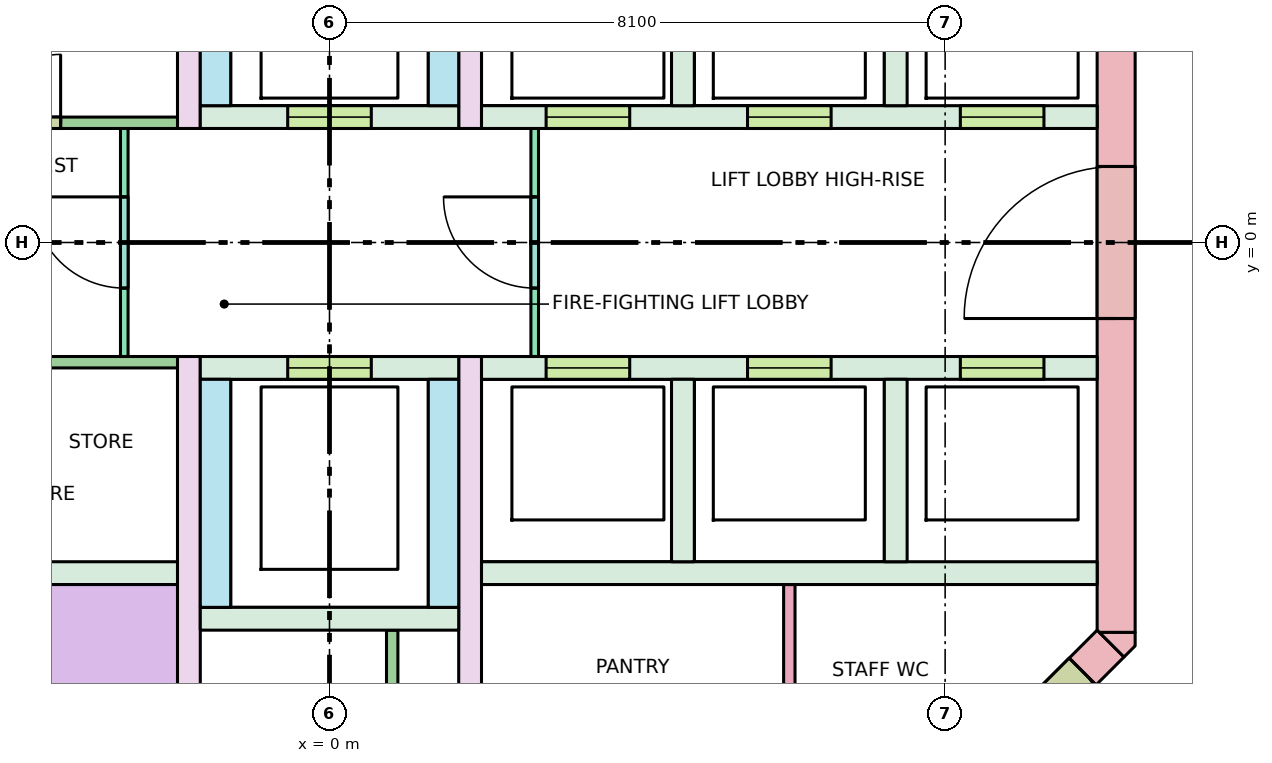
"""IFC4 building model, lengths in metres.
Left out: names, types, materials, properties, quantities, classifications, styles, units other than length and angle.
Written with IfcOpenShell. Run it as: python <this file> out.ifc"""

import sys

from ifc_helpers import new_model, si_unit, direction, frame, frame_2d, origin, place, context, subcontext, project, spatial, polyline, rectangle, outline, extrude, element, fill, save


model = new_model("IFC4")
c1 = context("Model", 3, precision=1e-05, world=origin(), true_north=direction((0.0, 1.0)))
c2 = subcontext(c1, "Body", "Model", "MODEL_VIEW")
j1 = project(units=[si_unit("LENGTHUNIT", "METRE"), si_unit("PLANEANGLEUNIT", "RADIAN")], contexts=[c1])
p1 = place(None, origin())
s1 = spatial("IfcSite", under=j1, at=p1, CompositionType="ELEMENT")
p2 = place(p1, origin())
s2 = spatial("IfcBuilding", under=s1, at=p2, CompositionType="ELEMENT")
p3 = place(p2, frame((0.0, 0.0, 287.1)))
s3 = spatial("IfcBuildingStorey", under=s2, at=p3, CompositionType="ELEMENT", Elevation=287.1)
p4 = place(p3, frame((10.35, -5.13, -0.28), z_axis=(0.0, 0.0, 1.0), x_axis=(0.0, 1.0, 0.0)))
e1 = element("IfcWall", 1, at=p4, inside=s3, PredefinedType="SHEAR", context=c2, shape_type="SweptSolid", body=[
    extrude(rectangle(XDim=10.26, YDim=0.5, at=frame_2d((5.13, 0.0))), origin(), (0.0, 0.0, 1.0), 3.7),
])
p5 = place(p4, frame((4.13, 0.0, 0.28)))
e2 = element("IfcOpeningElement", 2, at=p5, cuts=e1, PredefinedType="OPENING", context=c2, shape_type="SweptSolid", body=[
    extrude(rectangle(XDim=2.0, YDim=2.1, at=frame_2d((1.0, 1.05))), frame((0.0, 0.26, 0.0), z_axis=(0.0, -1.0, 0.0), x_axis=(1.0, 0.0, 0.0)), (0.0, 0.0, 1.0), 0.52),
])
p6 = place(p3, frame((10.277, -5.277, -0.28), z_axis=(0.0, 0.0, 1.0), x_axis=(-0.707106781187, -0.707106781187, 0.0)))
e3 = element("IfcWall", 3, at=p6, inside=s3, PredefinedType="SHEAR", context=c2, shape_type="SweptSolid", body=[
    extrude(rectangle(XDim=4.243, YDim=0.5, at=frame_2d((2.121, 0.0))), origin(), (0.0, 0.0, 1.0), 3.7),
])
p7 = place(p6, frame((0.52, 0.0, 0.28)))
e4 = element("IfcOpeningElement", 4, at=p7, cuts=e3, PredefinedType="OPENING", context=c2, shape_type="SweptSolid", body=[
    extrude(rectangle(XDim=0.9, YDim=2.1, at=frame_2d((0.45, 1.05))), frame((0.0, 0.26, 0.0), z_axis=(0.0, -1.0, 0.0), x_axis=(1.0, 0.0, 0.0)), (0.0, 0.0, 1.0), 0.52),
])
p8 = place(p3, frame((0.0, 0.0, -0.28)))
e5 = element("IfcWall", 5, at=p8, inside=s3, PredefinedType="SHEAR", context=c2, shape_type="SweptSolid", body=[
    extrude(outline(polyline([(10.6, -5.307), (10.454, -5.454), (10.13, -5.13), (10.6, -5.13), (10.6, -5.307)])), origin(), (0.0, 0.0, 1.0), 3.7),
])
for number, where, z_axis, x_axis in (
    (6, (-10.1, -4.35, 0.0), (0.0, 0.0, 1.0), (1.0, 0.0, 0.0)),
    (7, (2.0, -4.35, 0.0), (0.0, 0.0, 1.0), (1.0, 0.0, 0.0)),
):
    element("IfcWall", number, at=place(p3, frame(where, z_axis=z_axis, x_axis=x_axis)), inside=s3, PredefinedType="SOLIDWALL", context=c2, shape_type="SweptSolid", body=[
        extrude(rectangle(XDim=8.1, YDim=0.3, at=frame_2d((4.05, 0.0))), origin(), (0.0, 0.0, 1.0), 3.42),
    ])
p9 = place(p3, frame((2.0, 1.65, 0.0), z_axis=(0.0, 0.0, 1.0), x_axis=(1.0, 0.0, 0.0)))
e8 = element("IfcWall", 8, at=p9, inside=s3, PredefinedType="SOLIDWALL", context=c2, shape_type="SweptSolid", body=[
    extrude(rectangle(XDim=8.1, YDim=0.3, at=frame_2d((4.05, 0.0))), origin(), (0.0, 0.0, 1.0), 3.42),
])
p10 = place(p9, frame((0.85, 0.0, 0.0)))
e9 = element("IfcOpeningElement", 9, at=p10, cuts=e8, PredefinedType="OPENING", context=c2, shape_type="SweptSolid", body=[
    extrude(rectangle(XDim=1.1, YDim=2.1, at=frame_2d((0.55, 1.05))), frame((0.0, 0.16, 0.0), z_axis=(0.0, -1.0, 0.0), x_axis=(1.0, 0.0, 0.0)), (0.0, 0.0, 1.0), 0.32),
])
p11 = place(p9, frame((3.5, 0.0, 0.0)))
e10 = element("IfcOpeningElement", 10, at=p11, cuts=e8, PredefinedType="OPENING", context=c2, shape_type="SweptSolid", body=[
    extrude(rectangle(XDim=1.1, YDim=2.1, at=frame_2d((0.55, 1.05))), frame((0.0, 0.16, 0.0), z_axis=(0.0, -1.0, 0.0), x_axis=(1.0, 0.0, 0.0)), (0.0, 0.0, 1.0), 0.32),
])
p12 = place(p9, frame((6.3, 0.0, 0.0)))
e11 = element("IfcOpeningElement", 11, at=p12, cuts=e8, PredefinedType="OPENING", context=c2, shape_type="SweptSolid", body=[
    extrude(rectangle(XDim=1.1, YDim=2.1, at=frame_2d((0.55, 1.05))), frame((0.0, 0.16, 0.0), z_axis=(0.0, -1.0, 0.0), x_axis=(1.0, 0.0, 0.0)), (0.0, 0.0, 1.0), 0.32),
])
p13 = place(p3, frame((2.0, -1.65, 0.0), z_axis=(0.0, 0.0, 1.0), x_axis=(1.0, 0.0, 0.0)))
e12 = element("IfcWall", 12, at=p13, inside=s3, PredefinedType="SOLIDWALL", context=c2, shape_type="SweptSolid", body=[
    extrude(rectangle(XDim=8.1, YDim=0.3, at=frame_2d((4.05, 0.0))), origin(), (0.0, 0.0, 1.0), 3.42),
])
p14 = place(p13, frame((0.85, 0.0, 0.0)))
e13 = element("IfcOpeningElement", 13, at=p14, cuts=e12, PredefinedType="OPENING", context=c2, shape_type="SweptSolid", body=[
    extrude(rectangle(XDim=1.1, YDim=2.1, at=frame_2d((0.55, 1.05))), frame((0.0, 0.16, 0.0), z_axis=(0.0, -1.0, 0.0), x_axis=(1.0, 0.0, 0.0)), (0.0, 0.0, 1.0), 0.32),
])
p15 = place(p13, frame((3.5, 0.0, 0.0)))
e14 = element("IfcOpeningElement", 14, at=p15, cuts=e12, PredefinedType="OPENING", context=c2, shape_type="SweptSolid", body=[
    extrude(rectangle(XDim=1.1, YDim=2.1, at=frame_2d((0.55, 1.05))), frame((0.0, 0.16, 0.0), z_axis=(0.0, -1.0, 0.0), x_axis=(1.0, 0.0, 0.0)), (0.0, 0.0, 1.0), 0.32),
])
p16 = place(p13, frame((6.3, 0.0, 0.0)))
e15 = element("IfcOpeningElement", 15, at=p16, cuts=e12, PredefinedType="OPENING", context=c2, shape_type="SweptSolid", body=[
    extrude(rectangle(XDim=1.1, YDim=2.1, at=frame_2d((0.55, 1.05))), frame((0.0, 0.16, 0.0), z_axis=(0.0, -1.0, 0.0), x_axis=(1.0, 0.0, 0.0)), (0.0, 0.0, 1.0), 0.32),
])
for number, where, z_axis, x_axis in (
    (16, (4.65, 1.8, 0.0), (0.0, 0.0, 1.0), (0.0, 1.0, 0.0)),
    (17, (4.65, -4.2, 0.0), (0.0, 0.0, 1.0), (0.0, 1.0, 0.0)),
    (18, (7.45, 1.8, 0.0), (0.0, 0.0, 1.0), (0.0, 1.0, 0.0)),
    (19, (7.45, -4.2, 0.0), (0.0, 0.0, 1.0), (0.0, 1.0, 0.0)),
):
    element("IfcWall", number, at=place(p3, frame(where, z_axis=z_axis, x_axis=x_axis)), inside=s3, PredefinedType="SOLIDWALL", context=c2, shape_type="SweptSolid", body=[
        extrude(rectangle(XDim=2.4, YDim=0.3, at=frame_2d((1.2, 0.0))), origin(), (0.0, 0.0, 1.0), 3.42),
    ])
for number, where, z_axis, x_axis in (
    (20, (-1.85, 1.5, 0.0), (0.0, 0.0, 1.0), (0.0, 1.0, 0.0)),
    (21, (-1.85, -8.1, 0.0), (0.0, 0.0, 1.0), (0.0, 1.0, 0.0)),
    (22, (1.85, 1.5, 0.0), (0.0, 0.0, 1.0), (0.0, 1.0, 0.0)),
    (23, (1.85, -8.1, 0.0), (0.0, 0.0, 1.0), (0.0, 1.0, 0.0)),
):
    element("IfcWall", number, at=place(p3, frame(where, z_axis=z_axis, x_axis=x_axis)), inside=s3, PredefinedType="SHEAR", context=c2, shape_type="SweptSolid", body=[
        extrude(rectangle(XDim=6.6, YDim=0.3, at=frame_2d((3.3, 0.0))), origin(), (0.0, 0.0, 1.0), 3.42),
    ])
p17 = place(p3, frame((-1.7, 1.65, 0.0), z_axis=(0.0, 0.0, 1.0), x_axis=(1.0, 0.0, 0.0)))
e24 = element("IfcWall", 24, at=p17, inside=s3, PredefinedType="SOLIDWALL", context=c2, shape_type="SweptSolid", body=[
    extrude(rectangle(XDim=3.4, YDim=0.3, at=frame_2d((1.7, 0.0))), origin(), (0.0, 0.0, 1.0), 3.42),
])
p18 = place(p17, frame((1.15, 0.0, 0.0)))
e25 = element("IfcOpeningElement", 25, at=p18, cuts=e24, PredefinedType="OPENING", context=c2, shape_type="SweptSolid", body=[
    extrude(rectangle(XDim=1.1, YDim=2.1, at=frame_2d((0.55, 1.05))), frame((0.0, 0.16, 0.0), z_axis=(0.0, -1.0, 0.0), x_axis=(1.0, 0.0, 0.0)), (0.0, 0.0, 1.0), 0.32),
])
p19 = place(p3, frame((-1.7, -1.65, 0.0), z_axis=(0.0, 0.0, 1.0), x_axis=(1.0, 0.0, 0.0)))
e26 = element("IfcWall", 26, at=p19, inside=s3, PredefinedType="SOLIDWALL", context=c2, shape_type="SweptSolid", body=[
    extrude(rectangle(XDim=3.4, YDim=0.3, at=frame_2d((1.7, 0.0))), origin(), (0.0, 0.0, 1.0), 3.42),
])
p20 = place(p19, frame((1.15, 0.0, 0.0)))
e27 = element("IfcOpeningElement", 27, at=p20, cuts=e26, PredefinedType="OPENING", context=c2, shape_type="SweptSolid", body=[
    extrude(rectangle(XDim=1.1, YDim=2.1, at=frame_2d((0.55, 1.05))), frame((0.0, 0.16, 0.0), z_axis=(0.0, -1.0, 0.0), x_axis=(1.0, 0.0, 0.0)), (0.0, 0.0, 1.0), 0.32),
])
for number, where, z_axis, x_axis in (
    (28, (-1.5, 1.8, 0.0), (0.0, 0.0, 1.0), (0.0, 1.0, 0.0)),
    (29, (-1.5, -4.8, 0.0), (0.0, 0.0, 1.0), (0.0, 1.0, 0.0)),
    (30, (1.5, 1.8, 0.0), (0.0, 0.0, 1.0), (0.0, 1.0, 0.0)),
    (31, (1.5, -4.8, 0.0), (0.0, 0.0, 1.0), (0.0, 1.0, 0.0)),
):
    element("IfcWall", number, at=place(p3, frame(where, z_axis=z_axis, x_axis=x_axis)), inside=s3, PredefinedType="SOLIDWALL", context=c2, shape_type="SweptSolid", body=[
        extrude(rectangle(XDim=3.0, YDim=0.4, at=frame_2d((1.5, 0.0))), origin(), (0.0, 0.0, 1.0), 3.42),
    ])
p21 = place(p3, frame((-1.7, -4.95, 0.0), z_axis=(0.0, 0.0, 1.0), x_axis=(1.0, 0.0, 0.0)))
e32 = element("IfcWall", 32, at=p21, inside=s3, PredefinedType="SOLIDWALL", context=c2, shape_type="SweptSolid", body=[
    extrude(rectangle(XDim=3.4, YDim=0.3, at=frame_2d((1.7, 0.0))), origin(), (0.0, 0.0, 1.0), 3.42),
])
p22 = place(p3, frame((-2.7, -1.5, 0.0), z_axis=(0.0, 0.0, 1.0), x_axis=(0.0, 1.0, 0.0)))
e33 = element("IfcWall", 33, at=p22, inside=s3, PredefinedType="PARTITIONING", context=c2, shape_type="SweptSolid", body=[
    extrude(rectangle(XDim=3.0, YDim=0.1, at=frame_2d((1.5, 0.0))), origin(), (0.0, 0.0, 1.0), 3.42),
])
p23 = place(p22, frame((0.9, 0.0, 0.0)))
e34 = element("IfcOpeningElement", 34, at=p23, cuts=e33, PredefinedType="OPENING", context=c2, shape_type="SweptSolid", body=[
    extrude(rectangle(XDim=1.2, YDim=2.1, at=frame_2d((0.6, 1.05))), frame((0.0, 0.06, 0.0), z_axis=(0.0, -1.0, 0.0), x_axis=(1.0, 0.0, 0.0)), (0.0, 0.0, 1.0), 0.12),
])
p24 = place(p3, frame((2.7, -1.5, 0.0), z_axis=(0.0, 0.0, 1.0), x_axis=(0.0, 1.0, 0.0)))
e35 = element("IfcWall", 35, at=p24, inside=s3, PredefinedType="PARTITIONING", context=c2, shape_type="SweptSolid", body=[
    extrude(rectangle(XDim=3.0, YDim=0.1, at=frame_2d((1.5, 0.0))), origin(), (0.0, 0.0, 1.0), 3.42),
])
p25 = place(p24, frame((0.9, 0.0, 0.0)))
e36 = element("IfcOpeningElement", 36, at=p25, cuts=e35, PredefinedType="OPENING", context=c2, shape_type="SweptSolid", body=[
    extrude(rectangle(XDim=1.2, YDim=2.1, at=frame_2d((0.6, 1.05))), frame((0.0, 0.06, 0.0), z_axis=(0.0, -1.0, 0.0), x_axis=(1.0, 0.0, 0.0)), (0.0, 0.0, 1.0), 0.12),
])
p26 = place(p3, frame((0.825, -8.1, 0.0), z_axis=(0.0, 0.0, 1.0), x_axis=(0.0, 1.0, 0.0)))
e37 = element("IfcWall", 37, at=p26, inside=s3, PredefinedType="PARTITIONING", context=c2, shape_type="SweptSolid", body=[
    extrude(rectangle(XDim=3.0, YDim=0.15, at=frame_2d((1.5, 0.0))), origin(), (0.0, 0.0, 1.0), 3.42),
])
p27 = place(p3, frame((6.05, -8.1, 0.0), z_axis=(0.0, 0.0, 1.0), x_axis=(0.0, 1.0, 0.0)))
e38 = element("IfcWall", 38, at=p27, inside=s3, PredefinedType="PARTITIONING", context=c2, shape_type="SweptSolid", body=[
    extrude(rectangle(XDim=3.6, YDim=0.15, at=frame_2d((1.8, 0.0))), origin(), (0.0, 0.0, 1.0), 3.42),
])
p28 = place(p3, frame((-10.1, 1.575, 0.0), z_axis=(0.0, 0.0, 1.0), x_axis=(1.0, 0.0, 0.0)))
e39 = element("IfcWall", 39, at=p28, inside=s3, PredefinedType="PARTITIONING", context=c2, shape_type="SweptSolid", body=[
    extrude(rectangle(XDim=8.1, YDim=0.15, at=frame_2d((4.05, 0.0))), origin(), (0.0, 0.0, 1.0), 3.42),
])
p29 = place(p28, frame((1.538, 0.0, 0.0)))
e40 = element("IfcOpeningElement", 40, at=p29, cuts=e39, PredefinedType="OPENING", context=c2, shape_type="SweptSolid", body=[
    extrude(rectangle(XDim=0.9, YDim=2.1, at=frame_2d((0.45, 1.05))), frame((0.0, 0.085, 0.0), z_axis=(0.0, -1.0, 0.0), x_axis=(1.0, 0.0, 0.0)), (0.0, 0.0, 1.0), 0.17),
])
p30 = place(p28, frame((5.663, 0.0, 0.0)))
e41 = element("IfcOpeningElement", 41, at=p30, cuts=e39, PredefinedType="OPENING", context=c2, shape_type="SweptSolid", body=[
    extrude(rectangle(XDim=0.9, YDim=2.1, at=frame_2d((0.45, 1.05))), frame((0.0, 0.085, 0.0), z_axis=(0.0, -1.0, 0.0), x_axis=(1.0, 0.0, 0.0)), (0.0, 0.0, 1.0), 0.17),
])
p31 = place(p3, frame((-10.1, -1.575, 0.0), z_axis=(0.0, 0.0, 1.0), x_axis=(1.0, 0.0, 0.0)))
e42 = element("IfcWall", 42, at=p31, inside=s3, PredefinedType="PARTITIONING", context=c2, shape_type="SweptSolid", body=[
    extrude(rectangle(XDim=8.1, YDim=0.15, at=frame_2d((4.05, 0.0))), origin(), (0.0, 0.0, 1.0), 3.42),
])
p32 = place(p31, frame((0.33, 0.0, 0.0)))
e43 = element("IfcOpeningElement", 43, at=p32, cuts=e42, PredefinedType="OPENING", context=c2, shape_type="SweptSolid", body=[
    extrude(rectangle(XDim=0.9, YDim=2.1, at=frame_2d((0.45, 1.05))), frame((0.0, 0.085, 0.0), z_axis=(0.0, -1.0, 0.0), x_axis=(1.0, 0.0, 0.0)), (0.0, 0.0, 1.0), 0.17),
])
p33 = place(p31, frame((2.04, 0.0, 0.0)))
e44 = element("IfcOpeningElement", 44, at=p33, cuts=e42, PredefinedType="OPENING", context=c2, shape_type="SweptSolid", body=[
    extrude(rectangle(XDim=0.9, YDim=2.1, at=frame_2d((0.45, 1.05))), frame((0.0, 0.085, 0.0), z_axis=(0.0, -1.0, 0.0), x_axis=(1.0, 0.0, 0.0)), (0.0, 0.0, 1.0), 0.17),
])
p34 = place(p31, frame((5.31, 0.0, 0.0)))
e45 = element("IfcOpeningElement", 45, at=p34, cuts=e42, PredefinedType="OPENING", context=c2, shape_type="SweptSolid", body=[
    extrude(rectangle(XDim=0.9, YDim=2.1, at=frame_2d((0.45, 1.05))), frame((0.0, 0.085, 0.0), z_axis=(0.0, -1.0, 0.0), x_axis=(1.0, 0.0, 0.0)), (0.0, 0.0, 1.0), 0.17),
])
p35 = place(p10, origin())
e46 = element("IfcDoor", 46, at=p35, inside=s3, OperationType="DOUBLE_DOOR_SLIDING", PredefinedType="DOOR", context=c2, shape_type="SweptSolid", body=[
    extrude(rectangle(XDim=1.1, YDim=2.1, at=frame_2d((0.55, 1.05))), frame((0.0, 0.025, 0.0), z_axis=(0.0, -1.0, 0.0), x_axis=(1.0, 0.0, 0.0)), (0.0, 0.0, 1.0), 0.05),
])
fill(e9, e46)
p36 = place(p11, origin())
e47 = element("IfcDoor", 47, at=p36, inside=s3, OperationType="DOUBLE_DOOR_SLIDING", PredefinedType="DOOR", context=c2, shape_type="SweptSolid", body=[
    extrude(rectangle(XDim=1.1, YDim=2.1, at=frame_2d((0.55, 1.05))), frame((0.0, 0.025, 0.0), z_axis=(0.0, -1.0, 0.0), x_axis=(1.0, 0.0, 0.0)), (0.0, 0.0, 1.0), 0.05),
])
fill(e10, e47)
p37 = place(p12, origin())
e48 = element("IfcDoor", 48, at=p37, inside=s3, OperationType="DOUBLE_DOOR_SLIDING", PredefinedType="DOOR", context=c2, shape_type="SweptSolid", body=[
    extrude(rectangle(XDim=1.1, YDim=2.1, at=frame_2d((0.55, 1.05))), frame((0.0, 0.025, 0.0), z_axis=(0.0, -1.0, 0.0), x_axis=(1.0, 0.0, 0.0)), (0.0, 0.0, 1.0), 0.05),
])
fill(e11, e48)
p38 = place(p14, origin())
e49 = element("IfcDoor", 49, at=p38, inside=s3, OperationType="DOUBLE_DOOR_SLIDING", PredefinedType="DOOR", context=c2, shape_type="SweptSolid", body=[
    extrude(rectangle(XDim=1.1, YDim=2.1, at=frame_2d((0.55, 1.05))), frame((0.0, 0.025, 0.0), z_axis=(0.0, -1.0, 0.0), x_axis=(1.0, 0.0, 0.0)), (0.0, 0.0, 1.0), 0.05),
])
fill(e13, e49)
p39 = place(p15, origin())
e50 = element("IfcDoor", 50, at=p39, inside=s3, OperationType="DOUBLE_DOOR_SLIDING", PredefinedType="DOOR", context=c2, shape_type="SweptSolid", body=[
    extrude(rectangle(XDim=1.1, YDim=2.1, at=frame_2d((0.55, 1.05))), frame((0.0, 0.025, 0.0), z_axis=(0.0, -1.0, 0.0), x_axis=(1.0, 0.0, 0.0)), (0.0, 0.0, 1.0), 0.05),
])
fill(e14, e50)
p40 = place(p16, origin())
e51 = element("IfcDoor", 51, at=p40, inside=s3, OperationType="DOUBLE_DOOR_SLIDING", PredefinedType="DOOR", context=c2, shape_type="SweptSolid", body=[
    extrude(rectangle(XDim=1.1, YDim=2.1, at=frame_2d((0.55, 1.05))), frame((0.0, 0.025, 0.0), z_axis=(0.0, -1.0, 0.0), x_axis=(1.0, 0.0, 0.0)), (0.0, 0.0, 1.0), 0.05),
])
fill(e15, e51)
p41 = place(p18, origin())
e52 = element("IfcDoor", 52, at=p41, inside=s3, OperationType="DOUBLE_DOOR_SLIDING", PredefinedType="DOOR", context=c2, shape_type="SweptSolid", body=[
    extrude(rectangle(XDim=1.1, YDim=2.1, at=frame_2d((0.55, 1.05))), frame((0.0, 0.025, 0.0), z_axis=(0.0, -1.0, 0.0), x_axis=(1.0, 0.0, 0.0)), (0.0, 0.0, 1.0), 0.05),
])
fill(e25, e52)
p42 = place(p20, origin())
e53 = element("IfcDoor", 53, at=p42, inside=s3, OperationType="DOUBLE_DOOR_SLIDING", PredefinedType="DOOR", context=c2, shape_type="SweptSolid", body=[
    extrude(rectangle(XDim=1.1, YDim=2.1, at=frame_2d((0.55, 1.05))), frame((0.0, 0.025, 0.0), z_axis=(0.0, -1.0, 0.0), x_axis=(1.0, 0.0, 0.0)), (0.0, 0.0, 1.0), 0.05),
])
fill(e27, e53)
p43 = place(p5, origin())
e54 = element("IfcDoor", 54, at=p43, inside=s3, OperationType="DOUBLE_DOOR_SINGLE_SWING", PredefinedType="DOOR", context=c2, shape_type="SweptSolid", body=[
    extrude(rectangle(XDim=2.0, YDim=2.1, at=frame_2d((1.0, 1.05))), frame((0.0, 0.025, 0.0), z_axis=(0.0, -1.0, 0.0), x_axis=(1.0, 0.0, 0.0)), (0.0, 0.0, 1.0), 0.05),
])
fill(e2, e54)
p44 = place(p23, origin())
e55 = element("IfcDoor", 55, at=p44, inside=s3, OperationType="SINGLE_SWING_RIGHT", PredefinedType="DOOR", context=c2, shape_type="SweptSolid", body=[
    extrude(rectangle(XDim=1.2, YDim=2.1, at=frame_2d((0.6, 1.05))), frame((0.0, 0.025, 0.0), z_axis=(0.0, -1.0, 0.0), x_axis=(1.0, 0.0, 0.0)), (0.0, 0.0, 1.0), 0.05),
])
fill(e34, e55)
p45 = place(p25, origin())
e56 = element("IfcDoor", 56, at=p45, inside=s3, OperationType="SINGLE_SWING_RIGHT", PredefinedType="DOOR", context=c2, shape_type="SweptSolid", body=[
    extrude(rectangle(XDim=1.2, YDim=2.1, at=frame_2d((0.6, 1.05))), frame((0.0, 0.025, 0.0), z_axis=(0.0, -1.0, 0.0), x_axis=(1.0, 0.0, 0.0)), (0.0, 0.0, 1.0), 0.05),
])
fill(e36, e56)
p46 = place(p7, origin())
e57 = element("IfcDoor", 57, at=p46, inside=s3, OperationType="SINGLE_SWING_RIGHT", PredefinedType="DOOR", context=c2, shape_type="SweptSolid", body=[
    extrude(rectangle(XDim=0.9, YDim=2.1, at=frame_2d((0.45, 1.05))), frame((0.0, 0.025, 0.0), z_axis=(0.0, -1.0, 0.0), x_axis=(1.0, 0.0, 0.0)), (0.0, 0.0, 1.0), 0.05),
])
fill(e4, e57)
p47 = place(p30, origin())
e58 = element("IfcDoor", 58, at=p47, inside=s3, OperationType="SINGLE_SWING_RIGHT", PredefinedType="DOOR", context=c2, shape_type="SweptSolid", body=[
    extrude(rectangle(XDim=0.9, YDim=2.1, at=frame_2d((0.45, 1.05))), frame((0.0, 0.025, 0.0), z_axis=(0.0, -1.0, 0.0), x_axis=(1.0, 0.0, 0.0)), (0.0, 0.0, 1.0), 0.05),
])
fill(e41, e58)
save(model, sys.argv[1])
